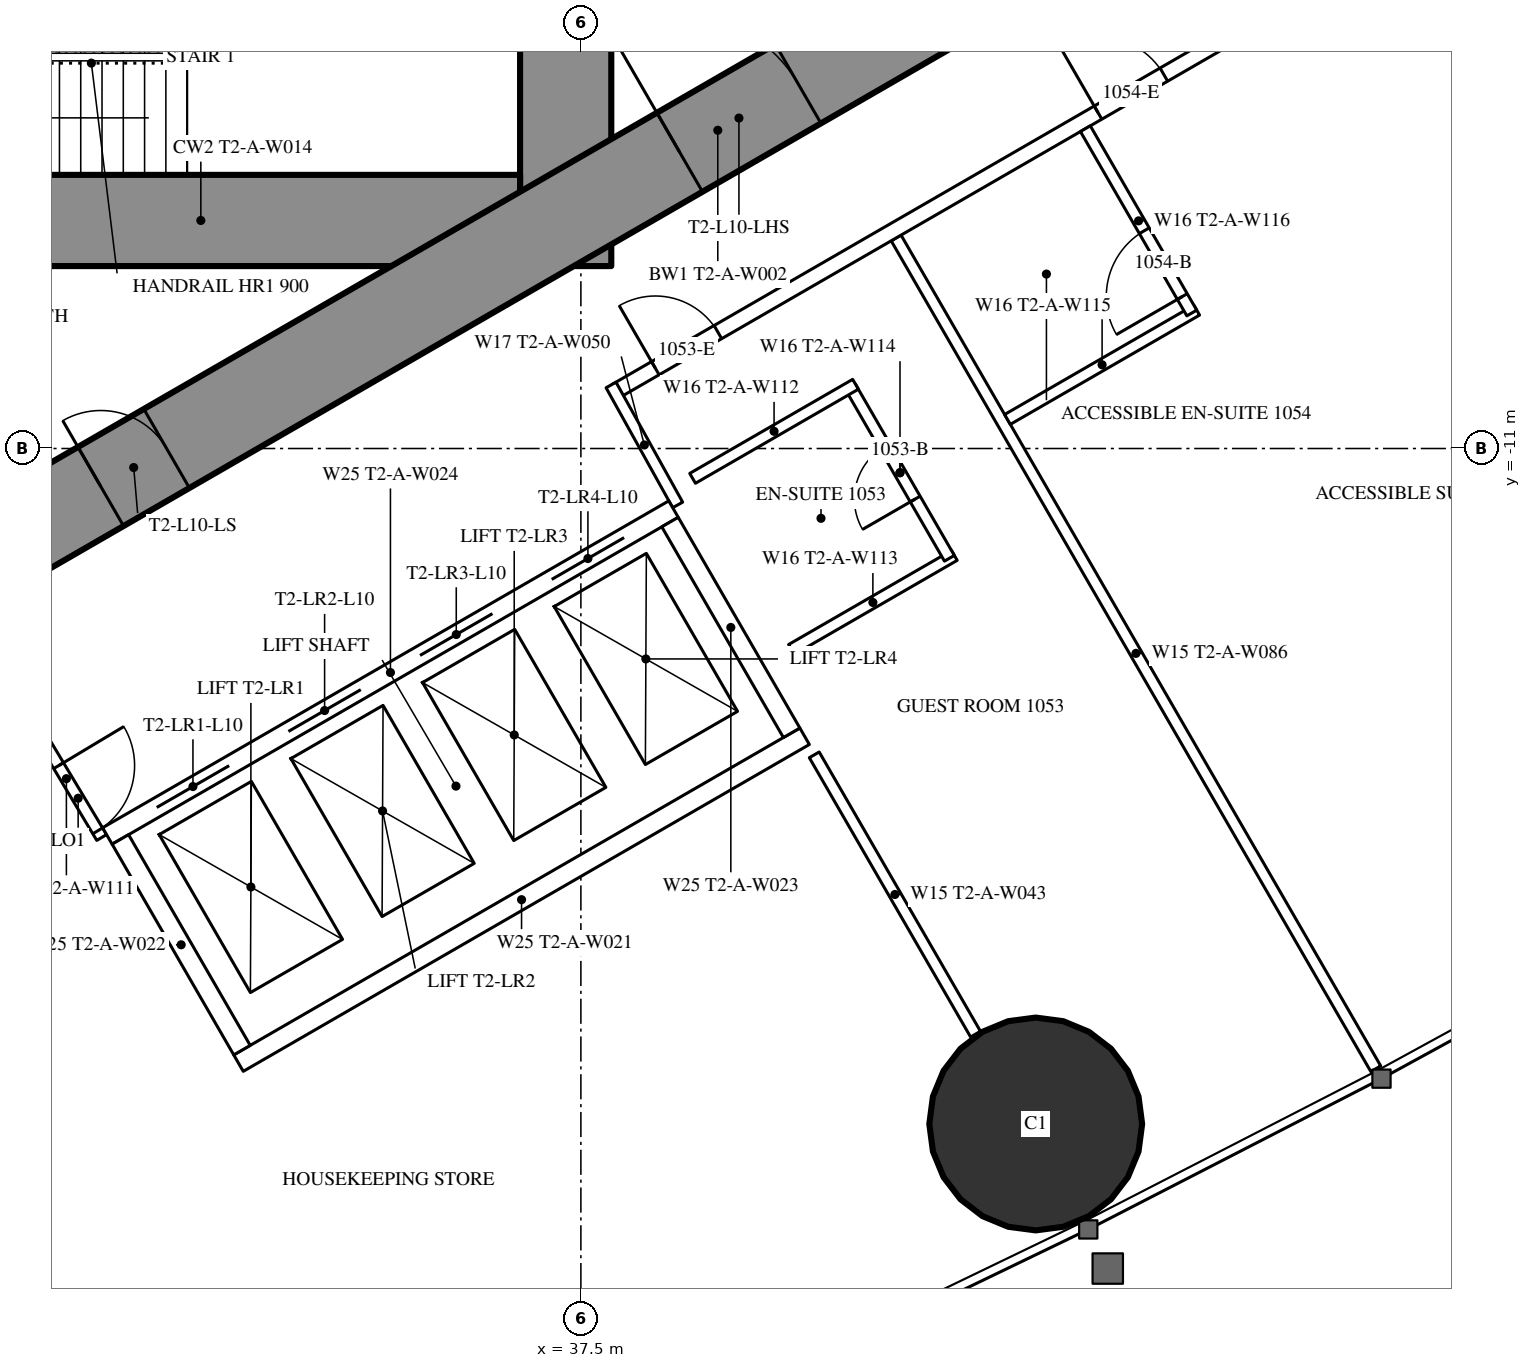
"""IFC4 building model, lengths in metres.
Left out: names, types, materials, properties, quantities, classifications, styles, units other than length and angle.
Written with IfcOpenShell. Run it as: python <this file> out.ifc"""

import sys

from ifc_helpers import new_model, si_unit, direction, frame, frame_2d, origin, origin_2d, place, context, subcontext, project, spatial, rectangle, hollow_circle, extrude, element, fill, save


model = new_model("IFC4")
c1 = context("Model", 3, precision=1e-05, world=origin(), true_north=direction((0.0, 1.0)))
c2 = subcontext(c1, "Body", "Model", "MODEL_VIEW")
j1 = project(units=[si_unit("LENGTHUNIT", "METRE"), si_unit("PLANEANGLEUNIT", "RADIAN")], contexts=[c1])
p1 = place(None, origin())
s1 = spatial("IfcSite", under=j1, at=p1, CompositionType="ELEMENT")
p2 = place(p1, origin())
s2 = spatial("IfcBuilding", under=s1, at=p2, CompositionType="ELEMENT")
p3 = place(p2, frame((0.0, 0.0, 42.5)))
s3 = spatial("IfcBuildingStorey", under=s2, at=p3, CompositionType="ELEMENT", Elevation=42.5)
p4 = place(p3, frame((43.484, -19.886, 0.0), z_axis=(0.0, 0.0, 1.0), x_axis=(1.0, 0.0, 0.0)))
e1 = element("IfcColumn", 1, at=p4, inside=s3, PredefinedType="COLUMN", context=c2, shape_type="SweptSolid", body=[
    extrude(hollow_circle(Radius=1.4, WallThickness=0.12, at=origin_2d()), origin(), (0.0, 0.0, 1.0), 3.5),
])
p5 = place(p3, frame((37.3, -8.6, 0.0), z_axis=(0.0, 0.0, 1.0), x_axis=(0.0, 1.0, 0.0)))
e2 = element("IfcWall", 2, at=p5, inside=s3, PredefinedType="SHEAR", context=c2, shape_type="SweptSolid", body=[
    extrude(rectangle(XDim=17.2, YDim=1.2, at=frame_2d((8.6, 0.0))), origin(), (0.0, 0.0, 1.0), 3.5),
])
p6 = place(p5, frame((7.7, 0.0, 0.0)))
e3 = element("IfcOpeningElement", 3, at=p6, cuts=e2, PredefinedType="OPENING", context=c2, shape_type="SweptSolid", body=[
    extrude(rectangle(XDim=1.8, YDim=2.2, at=frame_2d((0.9, 1.1))), frame((0.0, 0.61, 0.0), z_axis=(0.0, -1.0, 0.0), x_axis=(1.0, 0.0, 0.0)), (0.0, 0.0, 1.0), 1.22),
])
p7 = place(p3, frame((28.3, -8.0, 0.0), z_axis=(0.0, 0.0, 1.0), x_axis=(1.0, 0.0, 0.0)))
e4 = element("IfcWall", 4, at=p7, inside=s3, PredefinedType="SHEAR", context=c2, shape_type="SweptSolid", body=[
    extrude(rectangle(XDim=8.4, YDim=1.2, at=frame_2d((4.2, 0.0))), origin(), (0.0, 0.0, 1.0), 3.5),
])
p8 = place(p7, frame((0.25, 0.0, 0.0)))
e5 = element("IfcOpeningElement", 5, at=p8, cuts=e4, PredefinedType="OPENING", context=c2, shape_type="SweptSolid", body=[
    extrude(rectangle(XDim=1.0, YDim=2.2, at=frame_2d((0.5, 1.1))), frame((0.0, 0.61, 0.0), z_axis=(0.0, -1.0, 0.0), x_axis=(1.0, 0.0, 0.0)), (0.0, 0.0, 1.0), 1.22),
])
p9 = place(p3, frame((27.2, -13.8, 0.0), z_axis=(0.0, 0.0, 1.0), x_axis=(0.866027159892, 0.499996958321, 0.0)))
e6 = element("IfcWall", 6, at=p9, inside=s3, PredefinedType="SHEAR", context=c2, shape_type="SweptSolid", body=[
    extrude(rectangle(XDim=27.947, YDim=1.2, at=frame_2d((13.973, 0.0))), origin(), (0.0, 0.0, 1.0), 3.5),
])
p10 = place(p9, frame((4.6, 0.0, 0.0)))
e7 = element("IfcOpeningElement", 7, at=p10, cuts=e6, PredefinedType="OPENING", context=c2, shape_type="SweptSolid", body=[
    extrude(rectangle(XDim=1.0, YDim=2.2, at=frame_2d((0.5, 1.1))), frame((0.0, 0.61, 0.0), z_axis=(0.0, -1.0, 0.0), x_axis=(1.0, 0.0, 0.0)), (0.0, 0.0, 1.0), 1.22),
])
p11 = place(p9, frame((13.395, 0.0, 0.0)))
e8 = element("IfcOpeningElement", 8, at=p11, cuts=e6, PredefinedType="OPENING", context=c2, shape_type="SweptSolid", body=[
    extrude(rectangle(XDim=1.8, YDim=2.2, at=frame_2d((0.9, 1.1))), frame((0.0, 0.61, 0.0), z_axis=(0.0, -1.0, 0.0), x_axis=(1.0, 0.0, 0.0)), (0.0, 0.0, 1.0), 1.22),
])
p12 = place(p3, frame((41.647, -8.23, 0.0), z_axis=(0.0, 0.0, 1.0), x_axis=(0.49998590462, -0.866033541603, 0.0)))
e9 = element("IfcWall", 9, at=p12, inside=s3, PredefinedType="PARTITIONING", context=c2, shape_type="SweptSolid", body=[
    extrude(rectangle(XDim=12.621, YDim=0.15, at=frame_2d((6.311, 0.0))), origin(), (0.0, 0.0, 1.0), 3.25),
])
p13 = place(p3, frame((40.57, -15.03, 0.0), z_axis=(0.0, 0.0, 1.0), x_axis=(0.500012993597, -0.866017901798, 0.0)))
e10 = element("IfcWall", 10, at=p13, inside=s3, PredefinedType="PARTITIONING", context=c2, shape_type="SweptSolid", body=[
    extrude(rectangle(XDim=4.243, YDim=0.15, at=frame_2d((2.122, 0.0))), origin(), (0.0, 0.0, 1.0), 3.25),
])
p14 = place(p3, frame((37.96, -10.243, 0.0), z_axis=(0.0, 0.0, 1.0), x_axis=(0.866026429433, 0.499998223521, 0.0)))
e11 = element("IfcWall", 11, at=p14, inside=s3, PredefinedType="PARTITIONING", context=c2, shape_type="SweptSolid", body=[
    extrude(rectangle(XDim=20.487, YDim=0.2, at=frame_2d((10.243, 0.0))), origin(), (0.0, 0.0, 1.0), 3.25),
])
p15 = place(p14, frame((7.325, 0.0, 0.0)))
e12 = element("IfcOpeningElement", 12, at=p15, cuts=e11, PredefinedType="OPENING", context=c2, shape_type="SweptSolid", body=[
    extrude(rectangle(XDim=1.0, YDim=2.2, at=frame_2d((0.5, 1.1))), frame((0.0, 0.11, 0.0), z_axis=(0.0, -1.0, 0.0), x_axis=(1.0, 0.0, 0.0)), (0.0, 0.0, 1.0), 0.22),
])
p16 = place(p14, frame((18.937, 0.0, 0.0)))
e13 = element("IfcOpeningElement", 13, at=p16, cuts=e11, PredefinedType="OPENING", context=c2, shape_type="SweptSolid", body=[
    extrude(rectangle(XDim=0.95, YDim=2.2, at=frame_2d((0.475, 1.1))), frame((0.0, 0.11, 0.0), z_axis=(0.0, -1.0, 0.0), x_axis=(1.0, 0.0, 0.0)), (0.0, 0.0, 1.0), 0.22),
])
p17 = place(p14, frame((0.6, 0.0, 0.0)))
e14 = element("IfcOpeningElement", 14, at=p17, cuts=e11, PredefinedType="OPENING", context=c2, shape_type="SweptSolid", body=[
    extrude(rectangle(XDim=0.95, YDim=2.2, at=frame_2d((0.475, 1.1))), frame((0.0, 0.11, 0.0), z_axis=(0.0, -1.0, 0.0), x_axis=(1.0, 0.0, 0.0)), (0.0, 0.0, 1.0), 0.22),
])
p18 = place(p3, frame((38.773, -11.742, 0.0), z_axis=(0.0, 0.0, 1.0), x_axis=(-0.485528096672, 0.8742210632, 0.0)))
e15 = element("IfcWall", 15, at=p18, inside=s3, PredefinedType="PARTITIONING", context=c2, shape_type="SweptSolid", body=[
    extrude(rectangle(XDim=1.805, YDim=0.15, at=frame_2d((0.903, 0.0))), origin(), (0.0, 0.0, 1.0), 3.25),
])
p19 = place(p3, frame((30.267, -14.569, 0.0), z_axis=(0.0, 0.0, 1.0), x_axis=(0.514336634837, -0.857588377991, 0.0)))
e16 = element("IfcWall", 16, at=p19, inside=s3, PredefinedType="PARTITIONING", context=c2, shape_type="SweptSolid", body=[
    extrude(rectangle(XDim=1.805, YDim=0.15, at=frame_2d((0.903, 0.0))), origin(), (0.0, 0.0, 1.0), 3.25),
])
p20 = place(p19, frame((0.703, 0.0, 0.0)))
e17 = element("IfcOpeningElement", 17, at=p20, cuts=e16, PredefinedType="OPENING", context=c2, shape_type="SweptSolid", body=[
    extrude(rectangle(XDim=1.0, YDim=2.2, at=frame_2d((0.5, 1.1))), frame((0.0, 0.085, 0.0), z_axis=(0.0, -1.0, 0.0), x_axis=(1.0, 0.0, 0.0)), (0.0, 0.0, 1.0), 0.17),
])
p21 = place(p3, frame((43.112, -10.617, 0.0), z_axis=(0.0, 0.0, 1.0), x_axis=(0.866018712932, 0.500011588718, 0.0)))
e18 = element("IfcWall", 18, at=p21, inside=s3, PredefinedType="PARTITIONING", context=c2, shape_type="SweptSolid", body=[
    extrude(rectangle(XDim=2.875, YDim=0.15, at=frame_2d((1.438, 0.0))), origin(), (0.0, 0.0, 1.0), 3.25),
])
p22 = place(p3, frame((44.137, -6.792, 0.0), z_axis=(0.0, 0.0, 1.0), x_axis=(0.49994636267, -0.866056369097, 0.0)))
e19 = element("IfcWall", 19, at=p22, inside=s3, PredefinedType="PARTITIONING", context=c2, shape_type="SweptSolid", body=[
    extrude(rectangle(XDim=2.8, YDim=0.15, at=frame_2d((1.4, 0.0))), origin(), (0.0, 0.0, 1.0), 3.25),
])
p23 = place(p22, frame((1.55, 0.0, 0.0)))
e20 = element("IfcOpeningElement", 20, at=p23, cuts=e19, PredefinedType="OPENING", context=c2, shape_type="SweptSolid", body=[
    extrude(rectangle(XDim=1.0, YDim=2.2, at=frame_2d((0.5, 1.1))), frame((0.0, 0.085, 0.0), z_axis=(0.0, -1.0, 0.0), x_axis=(1.0, 0.0, 0.0)), (0.0, 0.0, 1.0), 0.17),
])
p24 = place(p3, frame((40.27, -13.644, 0.0), z_axis=(0.0, 0.0, 1.0), x_axis=(0.866031185235, 0.4999899861, 0.0)))
e21 = element("IfcWall", 21, at=p24, inside=s3, PredefinedType="PARTITIONING", context=c2, shape_type="SweptSolid", body=[
    extrude(rectangle(XDim=2.475, YDim=0.15, at=frame_2d((1.238, 0.0))), origin(), (0.0, 0.0, 1.0), 3.25),
])
p25 = place(p3, frame((41.048, -10.193, 0.0), z_axis=(0.0, 0.0, 1.0), x_axis=(0.500047596559, -0.865997922154, 0.0)))
e22 = element("IfcWall", 22, at=p25, inside=s3, PredefinedType="PARTITIONING", context=c2, shape_type="SweptSolid", body=[
    extrude(rectangle(XDim=2.6, YDim=0.15, at=frame_2d((1.3, 0.0))), origin(), (0.0, 0.0, 1.0), 3.25),
])
p26 = place(p25, frame((0.9, 0.0, 0.0)))
e23 = element("IfcOpeningElement", 23, at=p26, cuts=e22, PredefinedType="OPENING", context=c2, shape_type="SweptSolid", body=[
    extrude(rectangle(XDim=0.8, YDim=2.2, at=frame_2d((0.4, 1.1))), frame((0.0, 0.085, 0.0), z_axis=(0.0, -1.0, 0.0), x_axis=(1.0, 0.0, 0.0)), (0.0, 0.0, 1.0), 0.17),
])
p27 = place(p3, frame((38.97, -11.393, 0.0), z_axis=(0.0, 0.0, 1.0), x_axis=(0.866031185235, 0.4999899861, 0.0)))
e24 = element("IfcWall", 24, at=p27, inside=s3, PredefinedType="PARTITIONING", context=c2, shape_type="SweptSolid", body=[
    extrude(rectangle(XDim=2.475, YDim=0.15, at=frame_2d((1.238, 0.0))), origin(), (0.0, 0.0, 1.0), 3.25),
])
p28 = place(p3, frame((31.271, -16.097, 0.0), z_axis=(0.0, 0.0, 1.0), x_axis=(0.86604045752, 0.499973925258, 0.0)))
e25 = element("IfcWall", 25, at=p28, inside=s3, PredefinedType="PARTITIONING", context=c2, shape_type="SweptSolid", body=[
    extrude(rectangle(XDim=8.6, YDim=0.25, at=frame_2d((4.3, 0.0))), origin(), (0.0, 0.0, 1.0), 3.25),
])
p29 = place(p28, frame((0.75, 0.0, 0.0)))
e26 = element("IfcOpeningElement", 26, at=p29, cuts=e25, PredefinedType="OPENING", context=c2, shape_type="SweptSolid", body=[
    extrude(rectangle(XDim=1.1, YDim=2.2, at=frame_2d((0.55, 1.1))), frame((0.0, 0.135, 0.0), z_axis=(0.0, -1.0, 0.0), x_axis=(1.0, 0.0, 0.0)), (0.0, 0.0, 1.0), 0.27),
])
p30 = place(p28, frame((2.75, 0.0, 0.0)))
e27 = element("IfcOpeningElement", 27, at=p30, cuts=e25, PredefinedType="OPENING", context=c2, shape_type="SweptSolid", body=[
    extrude(rectangle(XDim=1.1, YDim=2.2, at=frame_2d((0.55, 1.1))), frame((0.0, 0.135, 0.0), z_axis=(0.0, -1.0, 0.0), x_axis=(1.0, 0.0, 0.0)), (0.0, 0.0, 1.0), 0.27),
])
p31 = place(p28, frame((4.75, 0.0, 0.0)))
e28 = element("IfcOpeningElement", 28, at=p31, cuts=e25, PredefinedType="OPENING", context=c2, shape_type="SweptSolid", body=[
    extrude(rectangle(XDim=1.1, YDim=2.2, at=frame_2d((0.55, 1.1))), frame((0.0, 0.135, 0.0), z_axis=(0.0, -1.0, 0.0), x_axis=(1.0, 0.0, 0.0)), (0.0, 0.0, 1.0), 0.27),
])
p32 = place(p28, frame((6.75, 0.0, 0.0)))
e29 = element("IfcOpeningElement", 29, at=p32, cuts=e25, PredefinedType="OPENING", context=c2, shape_type="SweptSolid", body=[
    extrude(rectangle(XDim=1.1, YDim=2.2, at=frame_2d((0.55, 1.1))), frame((0.0, 0.135, 0.0), z_axis=(0.0, -1.0, 0.0), x_axis=(1.0, 0.0, 0.0)), (0.0, 0.0, 1.0), 0.27),
])
p33 = place(p3, frame((32.996, -19.086, 0.0), z_axis=(0.0, 0.0, 1.0), x_axis=(0.866028165386, 0.499995216735, 0.0)))
e30 = element("IfcWall", 30, at=p33, inside=s3, PredefinedType="PARTITIONING", context=c2, shape_type="SweptSolid", body=[
    extrude(rectangle(XDim=8.6, YDim=0.25, at=frame_2d((4.3, 0.0))), origin(), (0.0, 0.0, 1.0), 3.25),
])
for number, where, z_axis, x_axis in (
    (31, (31.441, -16.143, 0.0), (0.0, 0.0, 1.0), (0.5, -0.866, 0.0)),
    (32, (38.673, -11.968, 0.0), (0.0, 0.0, 1.0), (0.5, -0.866, 0.0)),
):
    element("IfcWall", number, at=place(p3, frame(where, z_axis=z_axis, x_axis=x_axis)), inside=s3, PredefinedType="PARTITIONING", context=c2, shape_type="SweptSolid", body=[
        extrude(rectangle(XDim=3.201, YDim=0.25, at=frame_2d((1.6, 0.0))), origin(), (0.0, 0.0, 1.0), 3.25),
    ])
p34 = place(p23, origin())
e33 = element("IfcDoor", 33, at=p34, inside=s3, OperationType="SINGLE_SWING_RIGHT", PredefinedType="DOOR", context=c2, shape_type="SweptSolid", body=[
    extrude(rectangle(XDim=1.0, YDim=2.2, at=frame_2d((0.5, 1.1))), frame((0.0, 0.025, 0.0), z_axis=(0.0, -1.0, 0.0), x_axis=(1.0, 0.0, 0.0)), (0.0, 0.0, 1.0), 0.05),
])
fill(e20, e33)
p35 = place(p15, origin())
e34 = element("IfcDoor", 34, at=p35, inside=s3, OperationType="SINGLE_SWING_LEFT", PredefinedType="DOOR", context=c2, shape_type="SweptSolid", body=[
    extrude(rectangle(XDim=1.0, YDim=2.2, at=frame_2d((0.5, 1.1))), frame((0.0, 0.025, 0.0), z_axis=(0.0, -1.0, 0.0), x_axis=(1.0, 0.0, 0.0)), (0.0, 0.0, 1.0), 0.05),
])
fill(e12, e34)
p36 = place(p26, origin())
e35 = element("IfcDoor", 35, at=p36, inside=s3, OperationType="SINGLE_SWING_RIGHT", PredefinedType="DOOR", context=c2, shape_type="SweptSolid", body=[
    extrude(rectangle(XDim=0.8, YDim=2.2, at=frame_2d((0.4, 1.1))), frame((0.0, 0.025, 0.0), z_axis=(0.0, -1.0, 0.0), x_axis=(1.0, 0.0, 0.0)), (0.0, 0.0, 1.0), 0.05),
])
fill(e23, e35)
p37 = place(p17, origin())
e36 = element("IfcDoor", 36, at=p37, inside=s3, OperationType="SINGLE_SWING_LEFT", PredefinedType="DOOR", context=c2, shape_type="SweptSolid", body=[
    extrude(rectangle(XDim=0.95, YDim=2.2, at=frame_2d((0.475, 1.1))), frame((0.0, 0.025, 0.0), z_axis=(0.0, -1.0, 0.0), x_axis=(1.0, 0.0, 0.0)), (0.0, 0.0, 1.0), 0.05),
])
fill(e14, e36)
p38 = place(p20, origin())
e37 = element("IfcDoor", 37, at=p38, inside=s3, OperationType="SINGLE_SWING_LEFT", PredefinedType="DOOR", context=c2, shape_type="SweptSolid", body=[
    extrude(rectangle(XDim=1.0, YDim=2.2, at=frame_2d((0.5, 1.1))), frame((0.0, 0.025, 0.0), z_axis=(0.0, -1.0, 0.0), x_axis=(1.0, 0.0, 0.0)), (0.0, 0.0, 1.0), 0.05),
])
fill(e17, e37)
p39 = place(p10, origin())
e38 = element("IfcDoor", 38, at=p39, inside=s3, OperationType="SINGLE_SWING_LEFT", PredefinedType="DOOR", context=c2, shape_type="SweptSolid", body=[
    extrude(rectangle(XDim=1.0, YDim=2.2, at=frame_2d((0.5, 1.1))), frame((0.0, 0.025, 0.0), z_axis=(0.0, -1.0, 0.0), x_axis=(1.0, 0.0, 0.0)), (0.0, 0.0, 1.0), 0.05),
])
fill(e7, e38)
p40 = place(p11, origin())
e39 = element("IfcDoor", 39, at=p40, inside=s3, OperationType="DOUBLE_DOOR_SINGLE_SWING", PredefinedType="DOOR", context=c2, shape_type="SweptSolid", body=[
    extrude(rectangle(XDim=1.8, YDim=2.2, at=frame_2d((0.9, 1.1))), frame((0.0, 0.025, 0.0), z_axis=(0.0, -1.0, 0.0), x_axis=(1.0, 0.0, 0.0)), (0.0, 0.0, 1.0), 0.05),
])
fill(e8, e39)
p41 = place(p29, origin())
e40 = element("IfcDoor", 40, at=p41, inside=s3, OperationType="DOUBLE_DOOR_SLIDING", PredefinedType="USERDEFINED", context=c2, shape_type="SweptSolid", body=[
    extrude(rectangle(XDim=1.1, YDim=2.2, at=frame_2d((0.55, 1.1))), frame((0.0, 0.025, 0.0), z_axis=(0.0, -1.0, 0.0), x_axis=(1.0, 0.0, 0.0)), (0.0, 0.0, 1.0), 0.05),
])
fill(e26, e40)
p42 = place(p30, origin())
e41 = element("IfcDoor", 41, at=p42, inside=s3, OperationType="DOUBLE_DOOR_SLIDING", PredefinedType="USERDEFINED", context=c2, shape_type="SweptSolid", body=[
    extrude(rectangle(XDim=1.1, YDim=2.2, at=frame_2d((0.55, 1.1))), frame((0.0, 0.025, 0.0), z_axis=(0.0, -1.0, 0.0), x_axis=(1.0, 0.0, 0.0)), (0.0, 0.0, 1.0), 0.05),
])
fill(e27, e41)
p43 = place(p31, origin())
e42 = element("IfcDoor", 42, at=p43, inside=s3, OperationType="DOUBLE_DOOR_SLIDING", PredefinedType="USERDEFINED", context=c2, shape_type="SweptSolid", body=[
    extrude(rectangle(XDim=1.1, YDim=2.2, at=frame_2d((0.55, 1.1))), frame((0.0, 0.025, 0.0), z_axis=(0.0, -1.0, 0.0), x_axis=(1.0, 0.0, 0.0)), (0.0, 0.0, 1.0), 0.05),
])
fill(e28, e42)
p44 = place(p32, origin())
e43 = element("IfcDoor", 43, at=p44, inside=s3, OperationType="DOUBLE_DOOR_SLIDING", PredefinedType="USERDEFINED", context=c2, shape_type="SweptSolid", body=[
    extrude(rectangle(XDim=1.1, YDim=2.2, at=frame_2d((0.55, 1.1))), frame((0.0, 0.025, 0.0), z_axis=(0.0, -1.0, 0.0), x_axis=(1.0, 0.0, 0.0)), (0.0, 0.0, 1.0), 0.05),
])
fill(e29, e43)
save(model, sys.argv[1])
